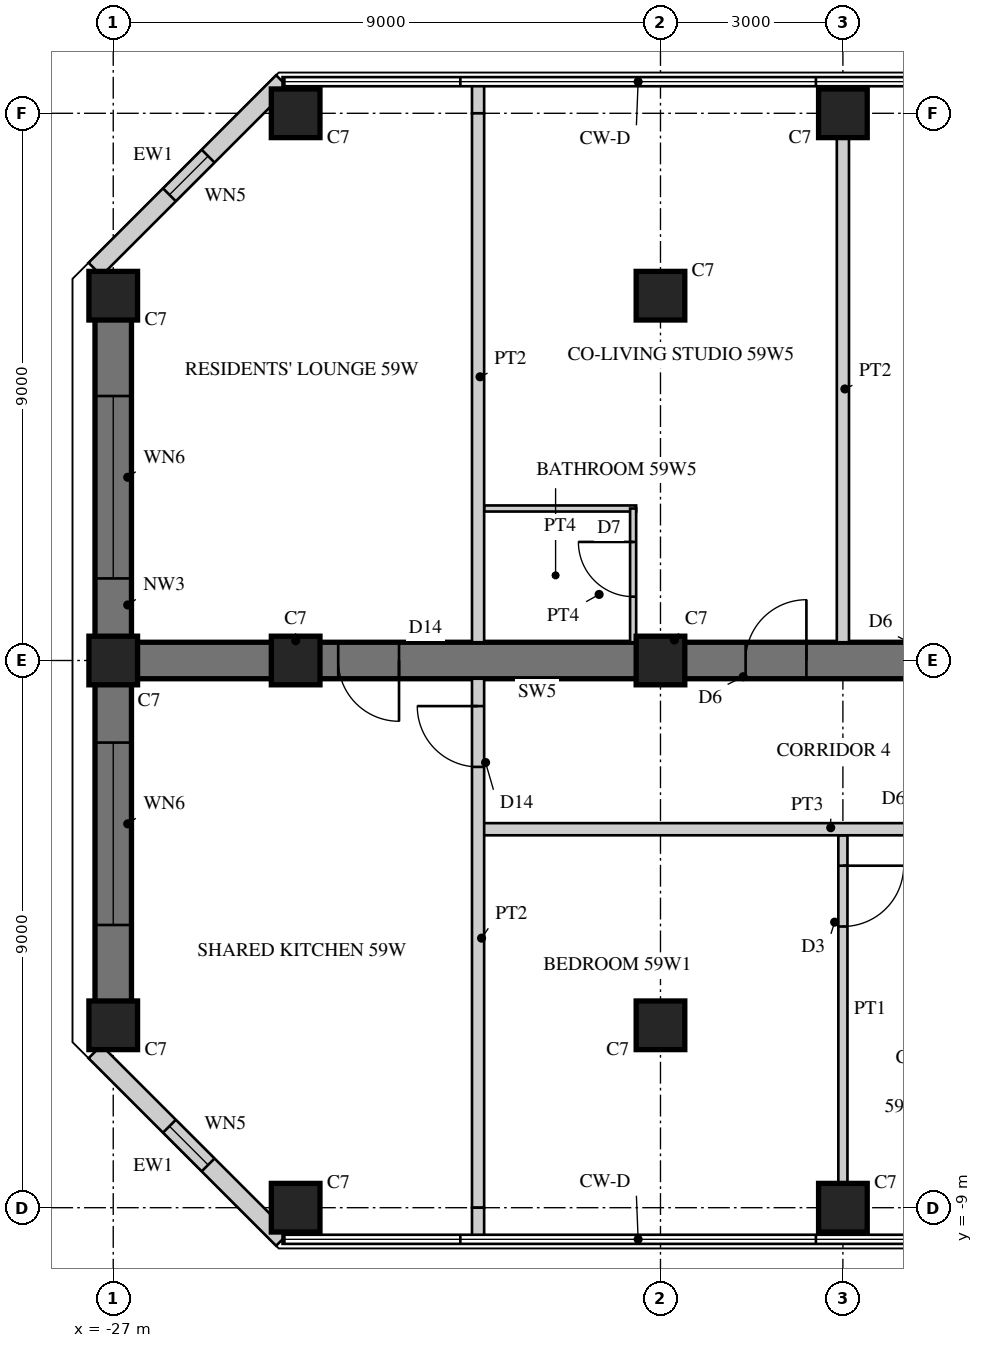
"""IFC4 building model, lengths in metres.
Left out: names, types, materials, properties, quantities, classifications, styles, units other than length and angle.
Written with IfcOpenShell. Run it as: python <this file> out.ifc"""

import sys

from ifc_helpers import new_model, si_unit, direction, frame, frame_2d, origin, origin_2d, place, context, subcontext, project, spatial, rectangle, hollow_rectangle, extrude, element, fill, save


model = new_model("IFC4")
c1 = context("Model", 3, precision=1e-05, world=origin(), true_north=direction((0.0, 1.0)))
c2 = subcontext(c1, "Body", "Model", "MODEL_VIEW")
j1 = project(units=[si_unit("LENGTHUNIT", "METRE"), si_unit("PLANEANGLEUNIT", "RADIAN")], contexts=[c1])
p1 = place(None, origin())
s1 = spatial("IfcSite", under=j1, at=p1, CompositionType="ELEMENT")
p2 = place(p1, origin())
s2 = spatial("IfcBuilding", under=s1, at=p2, CompositionType="ELEMENT")
p3 = place(p2, frame((0.0, 0.0, 232.3)))
s3 = spatial("IfcBuildingStorey", under=s2, at=p3, CompositionType="ELEMENT", Elevation=232.3)
p4 = place(p3, frame((-9.0, 0.0, 0.0), z_axis=(0.0, 0.0, 1.0), x_axis=(-1.0, 0.0, 0.0)))
e1 = element("IfcWall", 1, at=p4, inside=s3, PredefinedType="SHEAR", context=c2, shape_type="SweptSolid", body=[
    extrude(rectangle(XDim=18.0, YDim=0.6, at=frame_2d((9.0, 0.0))), origin(), (0.0, 0.0, 1.0), 3.4),
])
p5 = place(p4, frame((3.8, 0.0, 0.0)))
e2 = element("IfcOpeningElement", 2, at=p5, cuts=e1, PredefinedType="OPENING", context=c2, shape_type="SweptSolid", body=[
    extrude(rectangle(XDim=1.0, YDim=2.15, at=frame_2d((0.5, 1.075))), frame((0.0, 0.31, 0.0), z_axis=(0.0, -1.0, 0.0), x_axis=(1.0, 0.0, 0.0)), (0.0, 0.0, 1.0), 0.62),
])
p6 = place(p4, frame((6.6, 0.0, 0.0)))
e3 = element("IfcOpeningElement", 3, at=p6, cuts=e1, PredefinedType="OPENING", context=c2, shape_type="SweptSolid", body=[
    extrude(rectangle(XDim=1.0, YDim=2.15, at=frame_2d((0.5, 1.075))), frame((0.0, 0.31, 0.0), z_axis=(0.0, -1.0, 0.0), x_axis=(1.0, 0.0, 0.0)), (0.0, 0.0, 1.0), 0.62),
])
p7 = place(p4, frame((13.3, 0.0, 0.0)))
e4 = element("IfcOpeningElement", 4, at=p7, cuts=e1, PredefinedType="OPENING", context=c2, shape_type="SweptSolid", body=[
    extrude(rectangle(XDim=1.0, YDim=2.2, at=frame_2d((0.5, 1.1))), frame((0.0, 0.31, 0.0), z_axis=(0.0, -1.0, 0.0), x_axis=(1.0, 0.0, 0.0)), (0.0, 0.0, 1.0), 0.62),
])
p8 = place(p3, frame((-27.0, 6.0, 0.0), z_axis=(0.0, 0.0, 1.0), x_axis=(0.0, -1.0, 0.0)))
e5 = element("IfcWall", 5, at=p8, inside=s3, PredefinedType="SHEAR", context=c2, shape_type="SweptSolid", body=[
    extrude(rectangle(XDim=12.0, YDim=0.6, at=frame_2d((6.0, 0.0))), origin(), (0.0, 0.0, 1.0), 3.4),
])
p9 = place(p8, frame((1.65, 0.0, 0.6)))
e6 = element("IfcOpeningElement", 6, at=p9, cuts=e5, PredefinedType="OPENING", context=c2, shape_type="SweptSolid", body=[
    extrude(rectangle(XDim=3.0, YDim=2.4, at=frame_2d((1.5, 1.2))), frame((0.0, 0.31, 0.0), z_axis=(0.0, -1.0, 0.0), x_axis=(1.0, 0.0, 0.0)), (0.0, 0.0, 1.0), 0.62),
])
p10 = place(p8, frame((7.35, 0.0, 0.6)))
e7 = element("IfcOpeningElement", 7, at=p10, cuts=e5, PredefinedType="OPENING", context=c2, shape_type="SweptSolid", body=[
    extrude(rectangle(XDim=3.0, YDim=2.4, at=frame_2d((1.5, 1.2))), frame((0.0, 0.31, 0.0), z_axis=(0.0, -1.0, 0.0), x_axis=(1.0, 0.0, 0.0)), (0.0, 0.0, 1.0), 0.62),
])
for number, where, z_axis, x_axis in (
    (8, (-15.0, 9.0, 0.0), (0.0, 0.0, 1.0), (1.0, 0.0, 0.0)),
    (9, (-24.0, 9.0, 0.0), (0.0, 0.0, 1.0), (1.0, 0.0, 0.0)),
    (10, (-15.0, -9.0, 0.0), (0.0, 0.0, 1.0), (1.0, 0.0, 0.0)),
    (11, (-24.0, -9.0, 0.0), (0.0, 0.0, 1.0), (1.0, 0.0, 0.0)),
    (12, (-27.0, 6.0, 0.0), (0.0, 0.0, 1.0), (1.0, 0.0, 0.0)),
    (13, (-27.0, 0.0, 0.0), (0.0, 0.0, 1.0), (1.0, 0.0, 0.0)),
    (14, (-27.0, -6.0, 0.0), (0.0, 0.0, 1.0), (1.0, 0.0, 0.0)),
    (15, (-18.0, 6.0, 0.0), (0.0, 0.0, 1.0), (1.0, 0.0, 0.0)),
    (16, (-18.0, 0.0, 0.0), (0.0, 0.0, 1.0), (1.0, 0.0, 0.0)),
    (17, (-18.0, -6.0, 0.0), (0.0, 0.0, 1.0), (1.0, 0.0, 0.0)),
    (18, (-24.0, 0.0, 0.0), (0.0, 0.0, 1.0), (1.0, 0.0, 0.0)),
):
    element("IfcColumn", number, at=place(p3, frame(where, z_axis=z_axis, x_axis=x_axis)), inside=s3, PredefinedType="COLUMN", context=c2, shape_type="SweptSolid", body=[
        extrude(rectangle(XDim=0.8, YDim=0.8, at=origin_2d()), origin(), (0.0, 0.0, 1.0), 3.4),
    ])
p11 = place(p3, frame((-24.215, 9.52, 0.0), z_axis=(0.0, 0.0, 1.0), x_axis=(-0.707106781187, -0.707106781187, 0.0)))
e19 = element("IfcWall", 19, at=p11, inside=s3, PredefinedType="SOLIDWALL", context=c2, shape_type="SweptSolid", body=[
    extrude(rectangle(XDim=4.363, YDim=0.3, at=frame_2d((2.181, 0.0))), origin(), (0.0, 0.0, 1.0), 3.22),
])
p12 = place(p11, frame((1.731, 0.0, 0.3)))
e20 = element("IfcOpeningElement", 20, at=p12, cuts=e19, PredefinedType="OPENING", context=c2, shape_type="SweptSolid", body=[
    extrude(rectangle(XDim=0.9, YDim=2.4, at=frame_2d((0.45, 1.2))), frame((0.0, 0.16, 0.0), z_axis=(0.0, -1.0, 0.0), x_axis=(1.0, 0.0, 0.0)), (0.0, 0.0, 1.0), 0.32),
])
p13 = place(p3, frame((-27.3, -6.435, 0.0), z_axis=(0.0, 0.0, 1.0), x_axis=(0.707106781187, -0.707106781187, 0.0)))
e21 = element("IfcWall", 21, at=p13, inside=s3, PredefinedType="SOLIDWALL", context=c2, shape_type="SweptSolid", body=[
    extrude(rectangle(XDim=4.363, YDim=0.3, at=frame_2d((2.181, 0.0))), origin(), (0.0, 0.0, 1.0), 3.22),
])
p14 = place(p13, frame((1.731, 0.0, 0.3)))
e22 = element("IfcOpeningElement", 22, at=p14, cuts=e21, PredefinedType="OPENING", context=c2, shape_type="SweptSolid", body=[
    extrude(rectangle(XDim=0.9, YDim=2.4, at=frame_2d((0.45, 1.2))), frame((0.0, 0.16, 0.0), z_axis=(0.0, -1.0, 0.0), x_axis=(1.0, 0.0, 0.0)), (0.0, 0.0, 1.0), 0.32),
])
p15 = place(p3, frame((-15.0, -2.875, 0.0), z_axis=(0.0, 0.0, 1.0), x_axis=(0.0, -1.0, 0.0)))
e23 = element("IfcWall", 23, at=p15, inside=s3, PredefinedType="PARTITIONING", context=c2, shape_type="SweptSolid", body=[
    extrude(rectangle(XDim=5.725, YDim=0.15, at=frame_2d((2.863, 0.0))), origin(), (0.0, 0.0, 1.0), 2.52),
])
p16 = place(p15, frame((0.5, 0.0, 0.0)))
e24 = element("IfcOpeningElement", 24, at=p16, cuts=e23, PredefinedType="OPENING", context=c2, shape_type="SweptSolid", body=[
    extrude(rectangle(XDim=1.0, YDim=2.1, at=frame_2d((0.5, 1.05))), frame((0.0, 0.085, 0.0), z_axis=(0.0, -1.0, 0.0), x_axis=(1.0, 0.0, 0.0)), (0.0, 0.0, 1.0), 0.17),
])
p17 = place(p3, frame((-15.0, 8.6, 0.0), z_axis=(0.0, 0.0, 1.0), x_axis=(0.0, -1.0, 0.0)))
e25 = element("IfcWall", 25, at=p17, inside=s3, PredefinedType="SOLIDWALL", context=c2, shape_type="SweptSolid", body=[
    extrude(rectangle(XDim=8.3, YDim=0.2, at=frame_2d((4.15, 0.0))), origin(), (0.0, 0.0, 1.0), 2.52),
])
p18 = place(p3, frame((-18.4, 2.5, 0.0), z_axis=(0.0, 0.0, 1.0), x_axis=(-1.0, 0.0, 0.0)))
e26 = element("IfcWall", 26, at=p18, inside=s3, PredefinedType="PARTITIONING", context=c2, shape_type="SweptSolid", body=[
    extrude(rectangle(XDim=2.5, YDim=0.1, at=frame_2d((1.25, 0.0))), origin(), (0.0, 0.0, 1.0), 3.22),
])
p19 = place(p3, frame((-18.45, 2.5, 0.0), z_axis=(0.0, 0.0, 1.0), x_axis=(0.0, -1.0, 0.0)))
e27 = element("IfcWall", 27, at=p19, inside=s3, PredefinedType="PARTITIONING", context=c2, shape_type="SweptSolid", body=[
    extrude(rectangle(XDim=2.2, YDim=0.1, at=frame_2d((1.1, 0.0))), origin(), (0.0, 0.0, 1.0), 3.22),
])
p20 = place(p19, frame((0.55, 0.0, 0.0)))
e28 = element("IfcOpeningElement", 28, at=p20, cuts=e27, PredefinedType="OPENING", context=c2, shape_type="SweptSolid", body=[
    extrude(rectangle(XDim=0.9, YDim=2.1, at=frame_2d((0.45, 1.05))), frame((0.0, 0.06, 0.0), z_axis=(0.0, -1.0, 0.0), x_axis=(1.0, 0.0, 0.0)), (0.0, 0.0, 1.0), 0.12),
])
p21 = place(p3, frame((-9.4, -2.775, 0.0), z_axis=(0.0, 0.0, 1.0), x_axis=(-1.0, 0.0, 0.0)))
e29 = element("IfcWall", 29, at=p21, inside=s3, PredefinedType="SOLIDWALL", context=c2, shape_type="SweptSolid", body=[
    extrude(rectangle(XDim=11.6, YDim=0.2, at=frame_2d((5.8, 0.0))), origin(), (0.0, 0.0, 1.0), 3.22),
])
p22 = place(p21, frame((3.4, 0.0, 0.0)))
e30 = element("IfcOpeningElement", 30, at=p22, cuts=e29, PredefinedType="OPENING", context=c2, shape_type="SweptSolid", body=[
    extrude(rectangle(XDim=1.0, YDim=2.15, at=frame_2d((0.5, 1.075))), frame((0.0, 0.11, 0.0), z_axis=(0.0, -1.0, 0.0), x_axis=(1.0, 0.0, 0.0)), (0.0, 0.0, 1.0), 0.22),
])
p23 = place(p3, frame((-21.0, 9.48, 0.0), z_axis=(0.0, 0.0, 1.0), x_axis=(0.0, -1.0, 0.0)))
e31 = element("IfcWall", 31, at=p23, inside=s3, PredefinedType="SOLIDWALL", context=c2, shape_type="SweptSolid", body=[
    extrude(rectangle(XDim=0.48, YDim=0.2, at=frame_2d((0.24, 0.0))), origin(), (0.0, 0.0, 1.0), 3.22),
])
p24 = place(p3, frame((-21.0, 9.0, 0.0), z_axis=(0.0, 0.0, 1.0), x_axis=(0.0, -1.0, 0.0)))
e32 = element("IfcWall", 32, at=p24, inside=s3, PredefinedType="SOLIDWALL", context=c2, shape_type="SweptSolid", body=[
    extrude(rectangle(XDim=8.7, YDim=0.2, at=frame_2d((4.35, 0.0))), origin(), (0.0, 0.0, 1.0), 2.67),
])
p25 = place(p3, frame((-21.0, -0.3, 0.0), z_axis=(0.0, 0.0, 1.0), x_axis=(0.0, -1.0, 0.0)))
e33 = element("IfcWall", 33, at=p25, inside=s3, PredefinedType="SOLIDWALL", context=c2, shape_type="SweptSolid", body=[
    extrude(rectangle(XDim=8.7, YDim=0.2, at=frame_2d((4.35, 0.0))), origin(), (0.0, 0.0, 1.0), 2.67),
])
p26 = place(p25, frame((0.45, 0.0, 0.0)))
e34 = element("IfcOpeningElement", 34, at=p26, cuts=e33, PredefinedType="OPENING", context=c2, shape_type="SweptSolid", body=[
    extrude(rectangle(XDim=1.0, YDim=2.2, at=frame_2d((0.5, 1.1))), frame((0.0, 0.11, 0.0), z_axis=(0.0, -1.0, 0.0), x_axis=(1.0, 0.0, 0.0)), (0.0, 0.0, 1.0), 0.22),
])
p27 = place(p3, frame((-21.0, -9.0, 0.0), z_axis=(0.0, 0.0, 1.0), x_axis=(0.0, -1.0, 0.0)))
e35 = element("IfcWall", 35, at=p27, inside=s3, PredefinedType="SOLIDWALL", context=c2, shape_type="SweptSolid", body=[
    extrude(rectangle(XDim=0.48, YDim=0.2, at=frame_2d((0.24, 0.0))), origin(), (0.0, 0.0, 1.0), 3.22),
])
p28 = place(p12, origin())
e36 = element("IfcWindow", 36, at=p28, inside=s3, PartitioningType="SINGLE_PANEL", PredefinedType="WINDOW", context=c2, shape_type="SweptSolid", body=[
    extrude(hollow_rectangle(XDim=0.9, YDim=2.4, WallThickness=0.06, at=frame_2d((0.45, 1.2))), frame((0.0, 0.03, 0.0), z_axis=(0.0, -1.0, 0.0), x_axis=(1.0, 0.0, 0.0)), (0.0, 0.0, 1.0), 0.06),
    extrude(rectangle(XDim=0.779, YDim=2.279, at=frame_2d((0.45, 1.2))), frame((0.0, 0.03, 0.0), z_axis=(0.0, -1.0, 0.0), x_axis=(1.0, 0.0, 0.0)), (0.0, 0.0, 1.0), 0.06),
])
fill(e20, e36)
p29 = place(p9, origin())
e37 = element("IfcWindow", 37, at=p29, inside=s3, PartitioningType="SINGLE_PANEL", PredefinedType="WINDOW", context=c2, shape_type="SweptSolid", body=[
    extrude(hollow_rectangle(XDim=3.0, YDim=2.4, WallThickness=0.06, at=frame_2d((1.5, 1.2))), frame((0.0, 0.03, 0.0), z_axis=(0.0, -1.0, 0.0), x_axis=(1.0, 0.0, 0.0)), (0.0, 0.0, 1.0), 0.06),
    extrude(rectangle(XDim=2.879, YDim=2.279, at=frame_2d((1.5, 1.2))), frame((0.0, 0.03, 0.0), z_axis=(0.0, -1.0, 0.0), x_axis=(1.0, 0.0, 0.0)), (0.0, 0.0, 1.0), 0.06),
])
fill(e6, e37)
p30 = place(p10, origin())
e38 = element("IfcWindow", 38, at=p30, inside=s3, PartitioningType="SINGLE_PANEL", PredefinedType="WINDOW", context=c2, shape_type="SweptSolid", body=[
    extrude(hollow_rectangle(XDim=3.0, YDim=2.4, WallThickness=0.06, at=frame_2d((1.5, 1.2))), frame((0.0, 0.03, 0.0), z_axis=(0.0, -1.0, 0.0), x_axis=(1.0, 0.0, 0.0)), (0.0, 0.0, 1.0), 0.06),
    extrude(rectangle(XDim=2.879, YDim=2.279, at=frame_2d((1.5, 1.2))), frame((0.0, 0.03, 0.0), z_axis=(0.0, -1.0, 0.0), x_axis=(1.0, 0.0, 0.0)), (0.0, 0.0, 1.0), 0.06),
])
fill(e7, e38)
p31 = place(p14, origin())
e39 = element("IfcWindow", 39, at=p31, inside=s3, PartitioningType="SINGLE_PANEL", PredefinedType="WINDOW", context=c2, shape_type="SweptSolid", body=[
    extrude(hollow_rectangle(XDim=0.9, YDim=2.4, WallThickness=0.06, at=frame_2d((0.45, 1.2))), frame((0.0, 0.03, 0.0), z_axis=(0.0, -1.0, 0.0), x_axis=(1.0, 0.0, 0.0)), (0.0, 0.0, 1.0), 0.06),
    extrude(rectangle(XDim=0.779, YDim=2.279, at=frame_2d((0.45, 1.2))), frame((0.0, 0.03, 0.0), z_axis=(0.0, -1.0, 0.0), x_axis=(1.0, 0.0, 0.0)), (0.0, 0.0, 1.0), 0.06),
])
fill(e22, e39)
p32 = place(p16, origin())
e40 = element("IfcDoor", 40, at=p32, inside=s3, OperationType="SINGLE_SWING_LEFT", PredefinedType="DOOR", context=c2, shape_type="SweptSolid", body=[
    extrude(rectangle(XDim=1.0, YDim=2.1, at=frame_2d((0.5, 1.05))), frame((0.0, 0.025, 0.0), z_axis=(0.0, -1.0, 0.0), x_axis=(1.0, 0.0, 0.0)), (0.0, 0.0, 1.0), 0.05),
])
fill(e24, e40)
p33 = place(p20, frame((0.9, 0.0, 0.0), z_axis=(0.0, 0.0, 1.0), x_axis=(-1.0, 0.0, 0.0)))
e41 = element("IfcDoor", 41, at=p33, inside=s3, OperationType="SINGLE_SWING_RIGHT", PredefinedType="DOOR", context=c2, shape_type="SweptSolid", body=[
    extrude(rectangle(XDim=0.9, YDim=2.1, at=frame_2d((0.45, 1.05))), frame((0.0, 0.025, 0.0), z_axis=(0.0, -1.0, 0.0), x_axis=(1.0, 0.0, 0.0)), (0.0, 0.0, 1.0), 0.05),
])
fill(e28, e41)
p34 = place(p26, frame((1.0, 0.0, 0.0), z_axis=(0.0, 0.0, 1.0), x_axis=(-1.0, 0.0, 0.0)))
e42 = element("IfcDoor", 42, at=p34, inside=s3, OperationType="SINGLE_SWING_RIGHT", PredefinedType="DOOR", context=c2, shape_type="SweptSolid", body=[
    extrude(rectangle(XDim=1.0, YDim=2.2, at=frame_2d((0.5, 1.1))), frame((0.0, 0.025, 0.0), z_axis=(0.0, -1.0, 0.0), x_axis=(1.0, 0.0, 0.0)), (0.0, 0.0, 1.0), 0.05),
])
fill(e34, e42)
p35 = place(p6, frame((1.0, 0.0, 0.0), z_axis=(0.0, 0.0, 1.0), x_axis=(-1.0, 0.0, 0.0)))
e43 = element("IfcDoor", 43, at=p35, inside=s3, OperationType="SINGLE_SWING_RIGHT", PredefinedType="DOOR", context=c2, shape_type="SweptSolid", body=[
    extrude(rectangle(XDim=1.0, YDim=2.15, at=frame_2d((0.5, 1.075))), frame((0.0, 0.025, 0.0), z_axis=(0.0, -1.0, 0.0), x_axis=(1.0, 0.0, 0.0)), (0.0, 0.0, 1.0), 0.05),
])
fill(e3, e43)
p36 = place(p7, origin())
e44 = element("IfcDoor", 44, at=p36, inside=s3, OperationType="SINGLE_SWING_LEFT", PredefinedType="DOOR", context=c2, shape_type="SweptSolid", body=[
    extrude(rectangle(XDim=1.0, YDim=2.2, at=frame_2d((0.5, 1.1))), frame((0.0, 0.025, 0.0), z_axis=(0.0, -1.0, 0.0), x_axis=(1.0, 0.0, 0.0)), (0.0, 0.0, 1.0), 0.05),
])
fill(e4, e44)
save(model, sys.argv[1])
